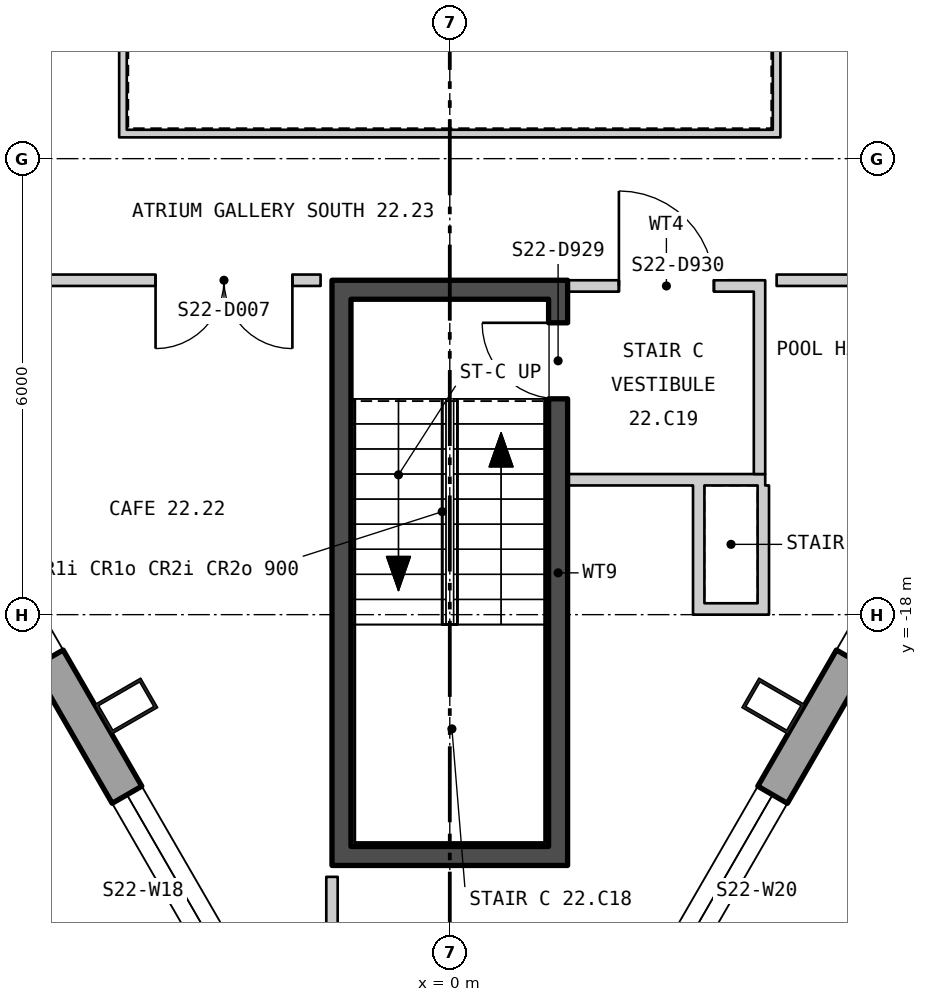
"""IFC4 building model, lengths in metres.
Left out: names, types, materials, properties, quantities, classifications, styles, units other than length and angle.
Written with IfcOpenShell. Run it as: python <this file> out.ifc"""

import sys

from ifc_helpers import new_model, si_unit, direction, frame, frame_2d, origin, origin_2d, place, context, subcontext, project, spatial, polyline, rectangle, hollow_rectangle, outline, extrude, element, fill, save


model = new_model("IFC4")
c1 = context("Model", 3, precision=1e-05, world=origin(), true_north=direction((0.0, 1.0)))
c2 = subcontext(c1, "Body", "Model", "MODEL_VIEW")
j1 = project(units=[si_unit("LENGTHUNIT", "METRE"), si_unit("PLANEANGLEUNIT", "RADIAN")], contexts=[c1])
p1 = place(None, origin())
s1 = spatial("IfcSite", under=j1, at=p1, CompositionType="ELEMENT")
p2 = place(p1, origin())
s2 = spatial("IfcBuilding", under=s1, at=p2, CompositionType="ELEMENT")
p3 = place(p2, frame((0.0, 0.0, 298.2)))
s3 = spatial("IfcBuildingStorey", under=s2, at=p3, CompositionType="ELEMENT", Elevation=298.2)
for number, where, z_axis, x_axis in (
    (1, (-4.257, -19.203, 0.0), (0.0, 0.0, 1.0), (0.5, -0.866, 0.0)),
    (2, (4.257, -19.203, 0.0), (0.0, 0.0, 1.0), (0.5, 0.866, 0.0)),
):
    element("IfcColumn", number, at=place(p3, frame(where, z_axis=z_axis, x_axis=x_axis)), inside=s3, PredefinedType="COLUMN", context=c2, shape_type="SweptSolid", body=[
        extrude(hollow_rectangle(XDim=0.45, YDim=0.7, WallThickness=0.04, at=origin_2d()), origin(), (0.0, 0.0, 1.0), 6.0),
    ])
p4 = place(p3, frame((-25.205, 15.931, -0.28), z_axis=(0.0, 0.0, 1.0), x_axis=(0.499999764979, -0.866025539474, 0.0)))
e3 = element("IfcWall", 3, at=p4, inside=s3, PredefinedType="SOLIDWALL", context=c2, shape_type="SweptSolid", body=[
    extrude(outline(polyline([(-0.13, -0.225), (45.87, -0.225), (45.61, 0.225), (0.13, 0.225), (-0.13, -0.225)])), origin(), (0.0, 0.0, 1.0), 6.1),
])
p5 = place(p4, frame((1.424, 0.0, 1.18)))
e4 = element("IfcOpeningElement", 4, at=p5, cuts=e3, PredefinedType="OPENING", context=c2, shape_type="SweptSolid", body=[
    extrude(rectangle(XDim=2.4, YDim=4.1, at=frame_2d((1.2, 2.05))), frame((0.0, 0.235, 0.0), z_axis=(0.0, -1.0, 0.0), x_axis=(1.0, 0.0, 0.0)), (0.0, 0.0, 1.0), 0.47),
])
p6 = place(p4, frame((5.893, 0.0, 1.18)))
e5 = element("IfcOpeningElement", 5, at=p6, cuts=e3, PredefinedType="OPENING", context=c2, shape_type="SweptSolid", body=[
    extrude(rectangle(XDim=2.4, YDim=4.1, at=frame_2d((1.2, 2.05))), frame((0.0, 0.235, 0.0), z_axis=(0.0, -1.0, 0.0), x_axis=(1.0, 0.0, 0.0)), (0.0, 0.0, 1.0), 0.47),
])
p7 = place(p4, frame((10.401, 0.0, 1.18)))
e6 = element("IfcOpeningElement", 6, at=p7, cuts=e3, PredefinedType="OPENING", context=c2, shape_type="SweptSolid", body=[
    extrude(rectangle(XDim=2.4, YDim=4.1, at=frame_2d((1.2, 2.05))), frame((0.0, 0.235, 0.0), z_axis=(0.0, -1.0, 0.0), x_axis=(1.0, 0.0, 0.0)), (0.0, 0.0, 1.0), 0.47),
])
p8 = place(p4, frame((14.909, 0.0, 1.18)))
e7 = element("IfcOpeningElement", 7, at=p8, cuts=e3, PredefinedType="OPENING", context=c2, shape_type="SweptSolid", body=[
    extrude(rectangle(XDim=2.4, YDim=4.1, at=frame_2d((1.2, 2.05))), frame((0.0, 0.235, 0.0), z_axis=(0.0, -1.0, 0.0), x_axis=(1.0, 0.0, 0.0)), (0.0, 0.0, 1.0), 0.47),
])
p9 = place(p4, frame((19.416, 0.0, 1.18)))
e8 = element("IfcOpeningElement", 8, at=p9, cuts=e3, PredefinedType="OPENING", context=c2, shape_type="SweptSolid", body=[
    extrude(rectangle(XDim=2.4, YDim=4.1, at=frame_2d((1.2, 2.05))), frame((0.0, 0.235, 0.0), z_axis=(0.0, -1.0, 0.0), x_axis=(1.0, 0.0, 0.0)), (0.0, 0.0, 1.0), 0.47),
])
p10 = place(p4, frame((23.924, 0.0, 1.18)))
e9 = element("IfcOpeningElement", 9, at=p10, cuts=e3, PredefinedType="OPENING", context=c2, shape_type="SweptSolid", body=[
    extrude(rectangle(XDim=2.4, YDim=4.1, at=frame_2d((1.2, 2.05))), frame((0.0, 0.235, 0.0), z_axis=(0.0, -1.0, 0.0), x_axis=(1.0, 0.0, 0.0)), (0.0, 0.0, 1.0), 0.47),
])
p11 = place(p4, frame((28.431, 0.0, 1.18)))
e10 = element("IfcOpeningElement", 10, at=p11, cuts=e3, PredefinedType="OPENING", context=c2, shape_type="SweptSolid", body=[
    extrude(rectangle(XDim=2.4, YDim=4.1, at=frame_2d((1.2, 2.05))), frame((0.0, 0.235, 0.0), z_axis=(0.0, -1.0, 0.0), x_axis=(1.0, 0.0, 0.0)), (0.0, 0.0, 1.0), 0.47),
])
p12 = place(p4, frame((32.939, 0.0, 1.18)))
e11 = element("IfcOpeningElement", 11, at=p12, cuts=e3, PredefinedType="OPENING", context=c2, shape_type="SweptSolid", body=[
    extrude(rectangle(XDim=2.4, YDim=4.1, at=frame_2d((1.2, 2.05))), frame((0.0, 0.235, 0.0), z_axis=(0.0, -1.0, 0.0), x_axis=(1.0, 0.0, 0.0)), (0.0, 0.0, 1.0), 0.47),
])
p13 = place(p4, frame((37.447, 0.0, 1.18)))
e12 = element("IfcOpeningElement", 12, at=p13, cuts=e3, PredefinedType="OPENING", context=c2, shape_type="SweptSolid", body=[
    extrude(rectangle(XDim=2.4, YDim=4.1, at=frame_2d((1.2, 2.05))), frame((0.0, 0.235, 0.0), z_axis=(0.0, -1.0, 0.0), x_axis=(1.0, 0.0, 0.0)), (0.0, 0.0, 1.0), 0.47),
])
p14 = place(p4, frame((41.916, 0.0, 1.18)))
e13 = element("IfcOpeningElement", 13, at=p14, cuts=e3, PredefinedType="OPENING", context=c2, shape_type="SweptSolid", body=[
    extrude(rectangle(XDim=2.4, YDim=4.1, at=frame_2d((1.2, 2.05))), frame((0.0, 0.235, 0.0), z_axis=(0.0, -1.0, 0.0), x_axis=(1.0, 0.0, 0.0)), (0.0, 0.0, 1.0), 0.47),
])
p15 = place(p3, frame((2.335, -23.682, -0.28), z_axis=(0.0, 0.0, 1.0), x_axis=(0.499999764979, 0.866025539474, 0.0)))
e14 = element("IfcWall", 14, at=p15, inside=s3, PredefinedType="SOLIDWALL", context=c2, shape_type="SweptSolid", body=[
    extrude(outline(polyline([(-0.13, -0.225), (45.87, -0.225), (45.61, 0.225), (0.13, 0.225), (-0.13, -0.225)])), origin(), (0.0, 0.0, 1.0), 6.1),
])
p16 = place(p15, frame((1.424, 0.0, 1.18)))
e15 = element("IfcOpeningElement", 15, at=p16, cuts=e14, PredefinedType="OPENING", context=c2, shape_type="SweptSolid", body=[
    extrude(rectangle(XDim=2.4, YDim=4.1, at=frame_2d((1.2, 2.05))), frame((0.0, 0.235, 0.0), z_axis=(0.0, -1.0, 0.0), x_axis=(1.0, 0.0, 0.0)), (0.0, 0.0, 1.0), 0.47),
])
p17 = place(p15, frame((5.893, 0.0, 1.18)))
e16 = element("IfcOpeningElement", 16, at=p17, cuts=e14, PredefinedType="OPENING", context=c2, shape_type="SweptSolid", body=[
    extrude(rectangle(XDim=2.4, YDim=4.1, at=frame_2d((1.2, 2.05))), frame((0.0, 0.235, 0.0), z_axis=(0.0, -1.0, 0.0), x_axis=(1.0, 0.0, 0.0)), (0.0, 0.0, 1.0), 0.47),
])
p18 = place(p15, frame((10.401, 0.0, 1.18)))
e17 = element("IfcOpeningElement", 17, at=p18, cuts=e14, PredefinedType="OPENING", context=c2, shape_type="SweptSolid", body=[
    extrude(rectangle(XDim=2.4, YDim=4.1, at=frame_2d((1.2, 2.05))), frame((0.0, 0.235, 0.0), z_axis=(0.0, -1.0, 0.0), x_axis=(1.0, 0.0, 0.0)), (0.0, 0.0, 1.0), 0.47),
])
p19 = place(p15, frame((14.909, 0.0, 1.18)))
e18 = element("IfcOpeningElement", 18, at=p19, cuts=e14, PredefinedType="OPENING", context=c2, shape_type="SweptSolid", body=[
    extrude(rectangle(XDim=2.4, YDim=4.1, at=frame_2d((1.2, 2.05))), frame((0.0, 0.235, 0.0), z_axis=(0.0, -1.0, 0.0), x_axis=(1.0, 0.0, 0.0)), (0.0, 0.0, 1.0), 0.47),
])
p20 = place(p15, frame((19.716, 0.0, 0.28)))
e19 = element("IfcOpeningElement", 19, at=p20, cuts=e14, PredefinedType="OPENING", context=c2, shape_type="SweptSolid", body=[
    extrude(rectangle(XDim=1.8, YDim=2.4, at=frame_2d((0.9, 1.2))), frame((0.0, 0.235, 0.0), z_axis=(0.0, -1.0, 0.0), x_axis=(1.0, 0.0, 0.0)), (0.0, 0.0, 1.0), 0.47),
])
p21 = place(p15, frame((24.224, 0.0, 0.28)))
e20 = element("IfcOpeningElement", 20, at=p21, cuts=e14, PredefinedType="OPENING", context=c2, shape_type="SweptSolid", body=[
    extrude(rectangle(XDim=1.8, YDim=2.4, at=frame_2d((0.9, 1.2))), frame((0.0, 0.235, 0.0), z_axis=(0.0, -1.0, 0.0), x_axis=(1.0, 0.0, 0.0)), (0.0, 0.0, 1.0), 0.47),
])
p22 = place(p15, frame((28.431, 0.0, 1.18)))
e21 = element("IfcOpeningElement", 21, at=p22, cuts=e14, PredefinedType="OPENING", context=c2, shape_type="SweptSolid", body=[
    extrude(rectangle(XDim=2.4, YDim=4.1, at=frame_2d((1.2, 2.05))), frame((0.0, 0.235, 0.0), z_axis=(0.0, -1.0, 0.0), x_axis=(1.0, 0.0, 0.0)), (0.0, 0.0, 1.0), 0.47),
])
p23 = place(p15, frame((32.939, 0.0, 1.18)))
e22 = element("IfcOpeningElement", 22, at=p23, cuts=e14, PredefinedType="OPENING", context=c2, shape_type="SweptSolid", body=[
    extrude(rectangle(XDim=2.4, YDim=4.1, at=frame_2d((1.2, 2.05))), frame((0.0, 0.235, 0.0), z_axis=(0.0, -1.0, 0.0), x_axis=(1.0, 0.0, 0.0)), (0.0, 0.0, 1.0), 0.47),
])
p24 = place(p15, frame((37.447, 0.0, 1.18)))
e23 = element("IfcOpeningElement", 23, at=p24, cuts=e14, PredefinedType="OPENING", context=c2, shape_type="SweptSolid", body=[
    extrude(rectangle(XDim=2.4, YDim=4.1, at=frame_2d((1.2, 2.05))), frame((0.0, 0.235, 0.0), z_axis=(0.0, -1.0, 0.0), x_axis=(1.0, 0.0, 0.0)), (0.0, 0.0, 1.0), 0.47),
])
p25 = place(p15, frame((41.916, 0.0, 1.18)))
e24 = element("IfcOpeningElement", 24, at=p25, cuts=e14, PredefinedType="OPENING", context=c2, shape_type="SweptSolid", body=[
    extrude(rectangle(XDim=2.4, YDim=4.1, at=frame_2d((1.2, 2.05))), frame((0.0, 0.235, 0.0), z_axis=(0.0, -1.0, 0.0), x_axis=(1.0, 0.0, 0.0)), (0.0, 0.0, 1.0), 0.47),
])
p26 = place(p3, frame((-4.35, -11.67, 0.0), z_axis=(0.0, 0.0, 1.0), x_axis=(1.0, 0.0, 0.0)))
e25 = element("IfcWall", 25, at=p26, inside=s3, PredefinedType="PARTITIONING", context=c2, shape_type="SweptSolid", body=[
    extrude(rectangle(XDim=8.7, YDim=0.1, at=frame_2d((4.35, 0.0))), origin(), (0.0, 0.0, 1.0), 5.8),
])
for number, where, z_axis, x_axis in (
    (26, (4.3, -11.62, 0.0), (0.0, 0.0, 1.0), (0.0, 1.0, 0.0)),
    (27, (-4.3, -3.58, 0.0), (0.0, 0.0, 1.0), (0.0, -1.0, 0.0)),
):
    element("IfcWall", number, at=place(p3, frame(where, z_axis=z_axis, x_axis=x_axis)), inside=s3, PredefinedType="PARTITIONING", context=c2, shape_type="SweptSolid", body=[
        extrude(rectangle(XDim=8.04, YDim=0.1, at=frame_2d((4.02, 0.0))), origin(), (0.0, 0.0, 1.0), 5.8),
    ])
p27 = place(p3, frame((-1.425, -21.05, 0.0), z_axis=(0.0, 0.0, 1.0), x_axis=(0.0, 1.0, 0.0)))
e28 = element("IfcWall", 28, at=p27, inside=s3, PredefinedType="SHEAR", context=c2, shape_type="SweptSolid", body=[
    extrude(rectangle(XDim=7.2, YDim=0.25, at=frame_2d((3.6, 0.0))), origin(), (0.0, 0.0, 1.0), 5.8),
])
p28 = place(p3, frame((1.425, -21.05, 0.0), z_axis=(0.0, 0.0, 1.0), x_axis=(0.0, 1.0, 0.0)))
e29 = element("IfcWall", 29, at=p28, inside=s3, PredefinedType="SHEAR", context=c2, shape_type="SweptSolid", body=[
    extrude(rectangle(XDim=7.2, YDim=0.25, at=frame_2d((3.6, 0.0))), origin(), (0.0, 0.0, 1.0), 5.8),
])
p29 = place(p28, frame((5.89, 0.0, 0.0)))
e30 = element("IfcOpeningElement", 30, at=p29, cuts=e29, PredefinedType="OPENING", context=c2, shape_type="SweptSolid", body=[
    extrude(rectangle(XDim=1.0, YDim=2.1, at=frame_2d((0.5, 1.05))), frame((0.0, 0.135, 0.0), z_axis=(0.0, -1.0, 0.0), x_axis=(1.0, 0.0, 0.0)), (0.0, 0.0, 1.0), 0.27),
])
for number, where, z_axis, x_axis in (
    (31, (-1.55, -21.175, 0.0), (0.0, 0.0, 1.0), (1.0, 0.0, 0.0)),
    (32, (-1.55, -13.725, 0.0), (0.0, 0.0, 1.0), (1.0, 0.0, 0.0)),
):
    element("IfcWall", number, at=place(p3, frame(where, z_axis=z_axis, x_axis=x_axis)), inside=s3, PredefinedType="SHEAR", context=c2, shape_type="SweptSolid", body=[
        extrude(rectangle(XDim=3.1, YDim=0.25, at=frame_2d((1.55, 0.0))), origin(), (0.0, 0.0, 1.0), 5.8),
    ])
p30 = place(p3, frame((1.55, -16.225, 0.0), z_axis=(0.0, 0.0, 1.0), x_axis=(1.0, 0.0, 0.0)))
e33 = element("IfcWall", 33, at=p30, inside=s3, PredefinedType="PARTITIONING", context=c2, shape_type="SweptSolid", body=[
    extrude(rectangle(XDim=2.6, YDim=0.15, at=frame_2d((1.3, 0.0))), origin(), (0.0, 0.0, 1.0), 5.8),
])
p31 = place(p3, frame((4.075, -16.15, 0.0), z_axis=(0.0, 0.0, 1.0), x_axis=(0.0, 1.0, 0.0)))
e34 = element("IfcWall", 34, at=p31, inside=s3, PredefinedType="PARTITIONING", context=c2, shape_type="SweptSolid", body=[
    extrude(rectangle(XDim=2.4, YDim=0.15, at=frame_2d((1.2, 0.0))), origin(), (0.0, 0.0, 1.0), 5.8),
])
p32 = place(p3, frame((1.55, -13.675, 0.0), z_axis=(0.0, 0.0, 1.0), x_axis=(1.0, 0.0, 0.0)))
e35 = element("IfcWall", 35, at=p32, inside=s3, PredefinedType="PARTITIONING", context=c2, shape_type="SweptSolid", body=[
    extrude(rectangle(XDim=2.6, YDim=0.15, at=frame_2d((1.3, 0.0))), origin(), (0.0, 0.0, 1.0), 4.986),
])
p33 = place(p32, frame((0.675, 0.0, 0.0)))
e36 = element("IfcOpeningElement", 36, at=p33, cuts=e35, PredefinedType="OPENING", context=c2, shape_type="SweptSolid", body=[
    extrude(rectangle(XDim=1.25, YDim=2.1, at=frame_2d((0.625, 1.05))), frame((0.0, 0.085, 0.0), z_axis=(0.0, -1.0, 0.0), x_axis=(1.0, 0.0, 0.0)), (0.0, 0.0, 1.0), 0.17),
])
p34 = place(p3, frame((3.275, -18.0, 0.0), z_axis=(0.0, 0.0, 1.0), x_axis=(0.0, 1.0, 0.0)))
e37 = element("IfcWall", 37, at=p34, inside=s3, PredefinedType="PARTITIONING", context=c2, shape_type="SweptSolid", body=[
    extrude(rectangle(XDim=1.7, YDim=0.15, at=frame_2d((0.85, 0.0))), origin(), (0.0, 0.0, 1.0), 5.35),
])
p35 = place(p3, frame((3.35, -17.925, 0.0), z_axis=(0.0, 0.0, 1.0), x_axis=(1.0, 0.0, 0.0)))
e38 = element("IfcWall", 38, at=p35, inside=s3, PredefinedType="PARTITIONING", context=c2, shape_type="SweptSolid", body=[
    extrude(rectangle(XDim=0.7, YDim=0.15, at=frame_2d((0.35, 0.0))), origin(), (0.0, 0.0, 1.0), 5.8),
])
p36 = place(p3, frame((4.125, -18.0, 0.0), z_axis=(0.0, 0.0, 1.0), x_axis=(0.0, 1.0, 0.0)))
e39 = element("IfcWall", 39, at=p36, inside=s3, PredefinedType="PARTITIONING", context=c2, shape_type="SweptSolid", body=[
    extrude(rectangle(XDim=1.7, YDim=0.15, at=frame_2d((0.85, 0.0))), origin(), (0.0, 0.0, 1.0), 5.8),
])
p37 = place(p3, frame((-7.075, -13.6, 0.0), z_axis=(0.0, 0.0, 1.0), x_axis=(1.0, 0.0, 0.0)))
e40 = element("IfcWall", 40, at=p37, inside=s3, PredefinedType="PARTITIONING", context=c2, shape_type="SweptSolid", body=[
    extrude(rectangle(XDim=5.375, YDim=0.15, at=frame_2d((2.688, 0.0))), origin(), (0.0, 0.0, 1.0), 4.986),
])
p38 = place(p37, frame((3.204, 0.0, 0.0)))
e41 = element("IfcOpeningElement", 41, at=p38, cuts=e40, PredefinedType="OPENING", context=c2, shape_type="SweptSolid", body=[
    extrude(rectangle(XDim=1.8, YDim=2.1, at=frame_2d((0.9, 1.05))), frame((0.0, 0.085, 0.0), z_axis=(0.0, -1.0, 0.0), x_axis=(1.0, 0.0, 0.0)), (0.0, 0.0, 1.0), 0.17),
])
p39 = place(p3, frame((-1.55, -22.397, 0.0), z_axis=(0.0, 0.0, 1.0), x_axis=(0.0, 1.0, 0.0)))
e42 = element("IfcWall", 42, at=p39, inside=s3, PredefinedType="PARTITIONING", context=c2, shape_type="SweptSolid", body=[
    extrude(rectangle(XDim=0.947, YDim=0.15, at=frame_2d((0.473, 0.0))), origin(), (0.0, 0.0, 1.0), 5.8),
])
p40 = place(p3, frame((4.3, -13.6, 0.0), z_axis=(0.0, 0.0, 1.0), x_axis=(1.0, 0.0, 0.0)))
e43 = element("IfcWall", 43, at=p40, inside=s3, PredefinedType="PARTITIONING", context=c2, shape_type="SweptSolid", body=[
    extrude(rectangle(XDim=2.775, YDim=0.15, at=frame_2d((1.387, 0.0))), origin(), (0.0, 0.0, 1.0), 4.986),
])
p41 = place(p13, origin())
e44 = element("IfcWindow", 44, at=p41, inside=s3, PartitioningType="SINGLE_PANEL", PredefinedType="WINDOW", context=c2, shape_type="SweptSolid", body=[
    extrude(rectangle(XDim=2.4, YDim=4.1, at=frame_2d((1.2, 2.05))), frame((0.0, 0.105, 0.0), z_axis=(0.0, -1.0, 0.0), x_axis=(1.0, 0.0, 0.0)), (0.0, 0.0, 1.0), 0.06),
])
fill(e12, e44)
p42 = place(p14, origin())
e45 = element("IfcWindow", 45, at=p42, inside=s3, PartitioningType="SINGLE_PANEL", PredefinedType="WINDOW", context=c2, shape_type="SweptSolid", body=[
    extrude(rectangle(XDim=2.4, YDim=4.1, at=frame_2d((1.2, 2.05))), frame((0.0, 0.105, 0.0), z_axis=(0.0, -1.0, 0.0), x_axis=(1.0, 0.0, 0.0)), (0.0, 0.0, 1.0), 0.06),
])
fill(e13, e45)
p43 = place(p16, origin())
e46 = element("IfcWindow", 46, at=p43, inside=s3, PartitioningType="SINGLE_PANEL", PredefinedType="WINDOW", context=c2, shape_type="SweptSolid", body=[
    extrude(rectangle(XDim=2.4, YDim=4.1, at=frame_2d((1.2, 2.05))), frame((0.0, 0.105, 0.0), z_axis=(0.0, -1.0, 0.0), x_axis=(1.0, 0.0, 0.0)), (0.0, 0.0, 1.0), 0.06),
])
fill(e15, e46)
p44 = place(p17, origin())
e47 = element("IfcWindow", 47, at=p44, inside=s3, PartitioningType="SINGLE_PANEL", PredefinedType="WINDOW", context=c2, shape_type="SweptSolid", body=[
    extrude(rectangle(XDim=2.4, YDim=4.1, at=frame_2d((1.2, 2.05))), frame((0.0, 0.105, 0.0), z_axis=(0.0, -1.0, 0.0), x_axis=(1.0, 0.0, 0.0)), (0.0, 0.0, 1.0), 0.06),
])
fill(e16, e47)
p45 = place(p29, origin())
e48 = element("IfcDoor", 48, at=p45, inside=s3, OperationType="SINGLE_SWING_LEFT", PredefinedType="DOOR", context=c2, shape_type="SweptSolid", body=[
    extrude(rectangle(XDim=1.0, YDim=2.1, at=frame_2d((0.5, 1.05))), frame((0.0, 0.025, 0.0), z_axis=(0.0, -1.0, 0.0), x_axis=(1.0, 0.0, 0.0)), (0.0, 0.0, 1.0), 0.05),
])
fill(e30, e48)
p46 = place(p33, origin())
e49 = element("IfcDoor", 49, at=p46, inside=s3, OperationType="SINGLE_SWING_RIGHT", PredefinedType="DOOR", context=c2, shape_type="SweptSolid", body=[
    extrude(rectangle(XDim=1.25, YDim=2.1, at=frame_2d((0.625, 1.05))), frame((0.0, 0.025, 0.0), z_axis=(0.0, -1.0, 0.0), x_axis=(1.0, 0.0, 0.0)), (0.0, 0.0, 1.0), 0.05),
])
fill(e36, e49)
p47 = place(p38, origin())
e50 = element("IfcDoor", 50, at=p47, inside=s3, OperationType="DOUBLE_DOOR_SINGLE_SWING", PredefinedType="DOOR", context=c2, shape_type="SweptSolid", body=[
    extrude(rectangle(XDim=1.8, YDim=2.1, at=frame_2d((0.9, 1.05))), frame((0.0, 0.025, 0.0), z_axis=(0.0, -1.0, 0.0), x_axis=(1.0, 0.0, 0.0)), (0.0, 0.0, 1.0), 0.05),
])
fill(e41, e50)
save(model, sys.argv[1])
